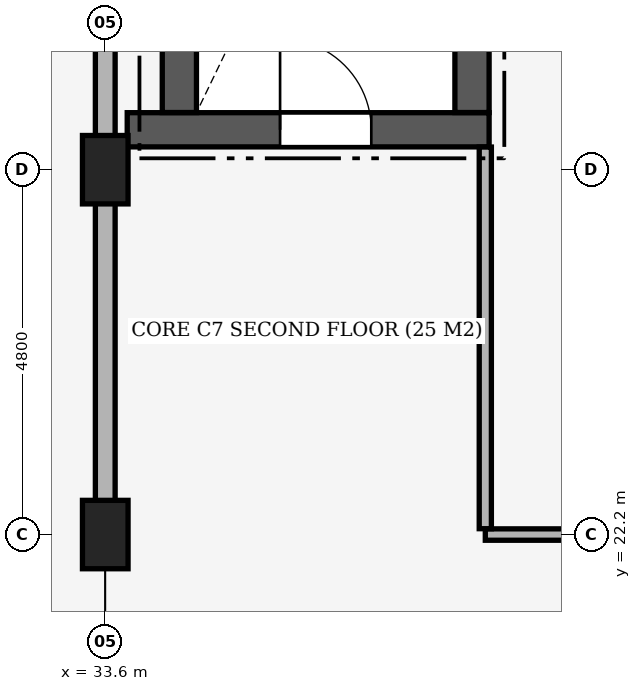
"""IFC4 building model, lengths in metres.
Left out: names, types, materials, properties, quantities, classifications, styles, units other than length and angle.
Written with IfcOpenShell. Run it as: python <this file> out.ifc"""

import sys

from ifc_helpers import new_model, si_unit, direction, frame, frame_2d, origin, origin_2d, place, context, subcontext, project, spatial, rectangle, extrude, element, fill, save


model = new_model("IFC4")
c1 = context("Model", 3, precision=1e-05, world=origin(), true_north=direction((0.0, 1.0)))
c2 = subcontext(c1, "Body", "Model", "MODEL_VIEW")
j1 = project(units=[si_unit("LENGTHUNIT", "METRE"), si_unit("PLANEANGLEUNIT", "RADIAN")], contexts=[c1])
p1 = place(None, origin())
s1 = spatial("IfcSite", under=j1, at=p1, CompositionType="ELEMENT")
p2 = place(p1, origin())
s2 = spatial("IfcBuilding", under=s1, at=p2, CompositionType="ELEMENT")
p3 = place(p2, frame((0.0, 0.0, 10.2)))
s3 = spatial("IfcBuildingStorey", under=s2, at=p3, CompositionType="ELEMENT", Elevation=10.2)
for number, where, z_axis, x_axis in (
    (1, (33.6, 22.2, 0.0), (0.0, 0.0, 1.0), (1.0, 0.0, 0.0)),
    (2, (33.6, 27.0, 0.0), (0.0, 0.0, 1.0), (1.0, 0.0, 0.0)),
):
    element("IfcColumn", number, at=place(p3, frame(where, z_axis=z_axis, x_axis=x_axis)), inside=s3, PredefinedType="COLUMN", context=c2, shape_type="SweptSolid", body=[
        extrude(rectangle(XDim=0.6, YDim=0.9, at=origin_2d()), origin(), (0.0, 0.0, 1.0), 5.1),
    ])
p4 = place(p3, frame((33.889, 27.525, 0.0), z_axis=(0.0, 0.0, 1.0), x_axis=(1.0, 0.0, 0.0)))
e3 = element("IfcWall", 3, at=p4, inside=s3, PredefinedType="SHEAR", context=c2, shape_type="SweptSolid", body=[
    extrude(rectangle(XDim=4.761, YDim=0.45, at=frame_2d((2.38, 0.0))), origin(), (0.0, 0.0, 1.0), 4.82),
])
p5 = place(p4, frame((2.011, 0.0, 0.0)))
e4 = element("IfcOpeningElement", 4, at=p5, cuts=e3, PredefinedType="OPENING", context=c2, shape_type="SweptSolid", body=[
    extrude(rectangle(XDim=1.2, YDim=2.2, at=frame_2d((0.6, 1.1))), frame((0.0, 0.24, 0.0), z_axis=(0.0, -1.0, 0.0), x_axis=(1.0, 0.0, 0.0)), (0.0, 0.0, 1.0), 0.48),
])
for number, where, z_axis, x_axis in (
    (5, (34.575, 27.752, 0.0), (0.0, 0.0, 1.0), (0.0, 1.0, 0.0)),
    (6, (38.425, 27.752, 0.0), (0.0, 0.0, 1.0), (0.0, 1.0, 0.0)),
):
    element("IfcWall", number, at=place(p3, frame(where, z_axis=z_axis, x_axis=x_axis)), inside=s3, PredefinedType="SHEAR", context=c2, shape_type="SweptSolid", body=[
        extrude(rectangle(XDim=7.046, YDim=0.45, at=frame_2d((3.523, 0.0))), origin(), (0.0, 0.0, 1.0), 4.82),
    ])
p6 = place(p3, frame((38.6, 22.2, 0.0), z_axis=(0.0, 0.0, 1.0), x_axis=(1.0, 0.0, 0.0)))
e7 = element("IfcWall", 7, at=p6, inside=s3, PredefinedType="PARTITIONING", context=c2, shape_type="SweptSolid", body=[
    extrude(rectangle(XDim=20.7, YDim=0.15, at=frame_2d((10.35, 0.0))), origin(), (0.0, 0.0, 1.0), 4.12),
])
p7 = place(p6, frame((9.425, 0.0, 0.0)))
e8 = element("IfcOpeningElement", 8, at=p7, cuts=e7, PredefinedType="OPENING", context=c2, shape_type="SweptSolid", body=[
    extrude(rectangle(XDim=0.95, YDim=2.1, at=frame_2d((0.475, 1.05))), frame((0.0, 0.09, 0.0), z_axis=(0.0, -1.0, 0.0), x_axis=(1.0, 0.0, 0.0)), (0.0, 0.0, 1.0), 0.18),
])
p8 = place(p3, frame((33.6, 22.2, 0.0), z_axis=(0.0, 0.0, 1.0), x_axis=(0.0, 1.0, 0.0)))
e9 = element("IfcWall", 9, at=p8, inside=s3, PredefinedType="PARTITIONING", context=c2, shape_type="SweptSolid", body=[
    extrude(rectangle(XDim=13.098, YDim=0.26, at=frame_2d((6.549, 0.0))), origin(), (0.0, 0.0, 1.0), 4.12),
])
p9 = place(p3, frame((38.6, 22.277, 0.0), z_axis=(0.0, 0.0, 1.0), x_axis=(0.0, 1.0, 0.0)))
e10 = element("IfcWall", 10, at=p9, inside=s3, PredefinedType="PARTITIONING", context=c2, shape_type="SweptSolid", body=[
    extrude(rectangle(XDim=5.021, YDim=0.16, at=frame_2d((2.51, 0.0))), origin(), (0.0, 0.0, 1.0), 4.12),
])
p10 = place(p5, origin())
e11 = element("IfcDoor", 11, at=p10, inside=s3, OperationType="SINGLE_SWING_LEFT", PredefinedType="DOOR", context=c2, shape_type="SweptSolid", body=[
    extrude(rectangle(XDim=1.2, YDim=2.2, at=frame_2d((0.6, 1.1))), frame((0.0, 0.025, 0.0), z_axis=(0.0, -1.0, 0.0), x_axis=(1.0, 0.0, 0.0)), (0.0, 0.0, 1.0), 0.05),
])
fill(e4, e11)
save(model, sys.argv[1])
